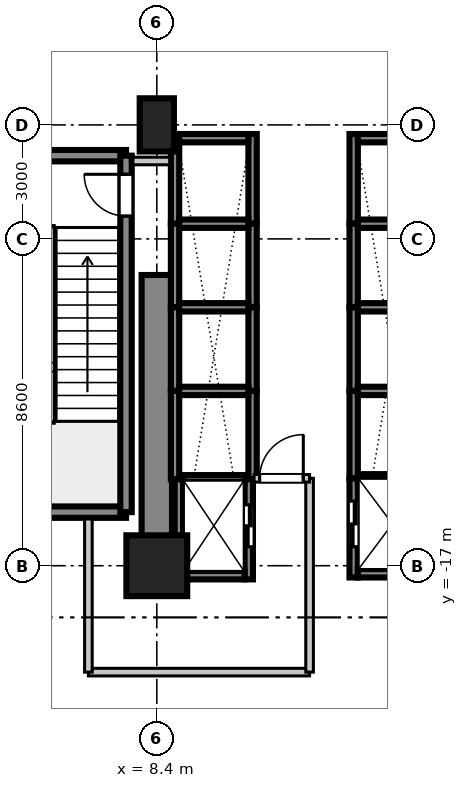
"""IFC4 building model, lengths in metres.
Left out: names, types, materials, properties, quantities, classifications, styles, units other than length and angle.
Written with IfcOpenShell. Run it as: python <this file> out.ifc"""

import sys

from ifc_helpers import new_model, si_unit, direction, frame, frame_2d, origin, origin_2d, place, context, subcontext, project, spatial, rectangle, extrude, source, transform, mapped, element, fill, save


model = new_model("IFC4")
c1 = context("Model", 3, precision=1e-05, world=origin(), true_north=direction((0.0, 1.0)))
c2 = subcontext(c1, "Body", "Model", "MODEL_VIEW")
j1 = project(units=[si_unit("LENGTHUNIT", "METRE"), si_unit("PLANEANGLEUNIT", "RADIAN")], contexts=[c1])
p1 = place(None, origin())
s1 = spatial("IfcSite", under=j1, at=p1, CompositionType="ELEMENT")
p2 = place(p1, origin())
s2 = spatial("IfcBuilding", under=s1, at=p2, CompositionType="ELEMENT")
p3 = place(p2, frame((0.0, 0.0, 5.4)))
s3 = spatial("IfcBuildingStorey", under=s2, at=p3, CompositionType="ELEMENT", Elevation=5.4)
m1 = source(origin(), c2, "Body", "SweptSolid", [
    extrude(rectangle(XDim=1.6, YDim=1.6, at=origin_2d()), origin(), (0.0, 0.0, 1.0), 5.355),
])
p4 = place(p3, frame((8.4, -17.0, 0.0), z_axis=(0.0, 0.0, 1.0), x_axis=(1.0, 0.0, 0.0)))
e1 = element("IfcColumn", 1, at=p4, inside=s3, PredefinedType="COLUMN", context=c2, shape_type="MappedRepresentation", body=[
    mapped(m1, transform((0.0, 0.0, 0.0), scale=1.0)),
])
m2 = source(origin(), c2, "Body", "SweptSolid", [
    extrude(rectangle(XDim=0.9, YDim=1.4, at=origin_2d()), origin(), (0.0, 0.0, 1.0), 5.355),
])
p5 = place(p3, frame((8.4, -5.4, 0.0), z_axis=(0.0, 0.0, 1.0), x_axis=(1.0, 0.0, 0.0)))
e2 = element("IfcColumn", 2, at=p5, inside=s3, PredefinedType="PILASTER", context=c2, shape_type="MappedRepresentation", body=[
    mapped(m2, transform((0.0, 0.0, 0.0), scale=1.0)),
])
m3 = source(origin(), c2, "Body", "SweptSolid", [
    extrude(rectangle(XDim=7.65, YDim=0.8, at=frame_2d((3.825, 0.0))), origin(), (0.0, 0.0, 1.0), 5.08),
])
p6 = place(p3, frame((8.4, -17.0, 0.0), z_axis=(0.0, 0.0, 1.0), x_axis=(0.0, 1.0, 0.0)))
e3 = element("IfcWall", 3, at=p6, inside=s3, PredefinedType="SHEAR", context=c2, shape_type="MappedRepresentation", body=[
    mapped(m3, transform((0.0, 0.0, 0.0), scale=1.0)),
])
m4 = source(origin(), c2, "Body", "SweptSolid", [
    extrude(rectangle(XDim=3.98, YDim=0.3, at=frame_2d((1.99, 0.0))), origin(), (0.0, 0.0, 1.0), 5.08),
])
for number, where, z_axis, x_axis in (
    (4, (3.61, -15.59, 0.0), (0.0, 0.0, 1.0), (1.0, 0.0, 0.0)),
    (5, (3.61, -6.21, 0.0), (0.0, 0.0, 1.0), (1.0, 0.0, 0.0)),
):
    element("IfcWall", number, at=place(p3, frame(where, z_axis=z_axis, x_axis=x_axis)), inside=s3, PredefinedType="SHEAR", context=c2, shape_type="MappedRepresentation", body=[
        mapped(m4, transform((0.0, 0.0, 0.0), scale=1.0)),
    ])
m5 = source(origin(), c2, "Body", "SweptSolid", [
    extrude(rectangle(XDim=9.38, YDim=0.3, at=frame_2d((4.69, 0.0))), origin(), (0.0, 0.0, 1.0), 5.08),
])
p7 = place(p3, frame((7.59, -15.59, 0.0), z_axis=(0.0, 0.0, 1.0), x_axis=(0.0, 1.0, 0.0)))
e6 = element("IfcWall", 6, at=p7, inside=s3, PredefinedType="SHEAR", context=c2, shape_type="MappedRepresentation", body=[
    mapped(m5, transform((0.0, 0.0, 0.0), scale=1.0)),
])
p8 = place(p7, frame((7.79, 0.0, 0.0)))
e7 = element("IfcOpeningElement", 7, at=p8, cuts=e6, PredefinedType="OPENING", context=c2, shape_type="SweptSolid", body=[
    extrude(rectangle(XDim=1.1, YDim=2.15, at=frame_2d((0.55, 1.075))), frame((0.0, 0.16, 0.0), z_axis=(0.0, -1.0, 0.0), x_axis=(1.0, 0.0, 0.0)), (0.0, 0.0, 1.0), 0.32),
])
m6 = source(origin(), c2, "Body", "SweptSolid", [
    extrude(rectangle(XDim=2.36, YDim=0.22, at=frame_2d((1.18, 0.0))), origin(), (0.0, 0.0, 1.0), 5.08),
])
p9 = place(p3, frame((13.58, -8.0, 0.0), z_axis=(0.0, 0.0, 1.0), x_axis=(0.0, 1.0, 0.0)))
e8 = element("IfcWall", 8, at=p9, inside=s3, PredefinedType="SHEAR", context=c2, shape_type="MappedRepresentation", body=[
    mapped(m6, transform((0.0, 0.0, 0.0), scale=1.0)),
])
m7 = source(origin(), c2, "Body", "SweptSolid", [
    extrude(rectangle(XDim=1.82, YDim=0.22, at=frame_2d((0.91, 0.0))), origin(), (0.0, 0.0, 1.0), 5.08),
])
p10 = place(p3, frame((13.69, -5.75, 0.0), z_axis=(0.0, 0.0, 1.0), x_axis=(1.0, 0.0, 0.0)))
e9 = element("IfcWall", 9, at=p10, inside=s3, PredefinedType="SHEAR", context=c2, shape_type="MappedRepresentation", body=[
    mapped(m7, transform((0.0, 0.0, 0.0), scale=1.0)),
])
m8 = source(origin(), c2, "Body", "SweptSolid", [
    extrude(rectangle(XDim=2.2, YDim=0.22, at=frame_2d((1.1, 0.0))), origin(), (0.0, 0.0, 1.0), 5.08),
])
p11 = place(p3, frame((13.58, -10.2, 0.0), z_axis=(0.0, 0.0, 1.0), x_axis=(0.0, 1.0, 0.0)))
e10 = element("IfcWall", 10, at=p11, inside=s3, PredefinedType="SHEAR", context=c2, shape_type="MappedRepresentation", body=[
    mapped(m8, transform((0.0, 0.0, 0.0), scale=1.0)),
])
m9 = source(origin(), c2, "Body", "SweptSolid", [
    extrude(rectangle(XDim=1.82, YDim=0.22, at=frame_2d((0.91, 0.0))), origin(), (0.0, 0.0, 1.0), 5.4),
])
p12 = place(p3, frame((13.69, -8.0, 0.0), z_axis=(0.0, 0.0, 1.0), x_axis=(1.0, 0.0, 0.0)))
e11 = element("IfcWall", 11, at=p12, inside=s3, PredefinedType="SHEAR", context=c2, shape_type="MappedRepresentation", body=[
    mapped(m9, transform((0.0, 0.0, 0.0), scale=1.0)),
])
p13 = place(p3, frame((13.58, -12.4, 0.0), z_axis=(0.0, 0.0, 1.0), x_axis=(0.0, 1.0, 0.0)))
e12 = element("IfcWall", 12, at=p13, inside=s3, PredefinedType="SHEAR", context=c2, shape_type="MappedRepresentation", body=[
    mapped(m8, transform((0.0, 0.0, 0.0), scale=1.0)),
])
p14 = place(p3, frame((13.69, -10.2, 0.0), z_axis=(0.0, 0.0, 1.0), x_axis=(1.0, 0.0, 0.0)))
e13 = element("IfcWall", 13, at=p14, inside=s3, PredefinedType="SHEAR", context=c2, shape_type="MappedRepresentation", body=[
    mapped(m9, transform((0.0, 0.0, 0.0), scale=1.0)),
])
m10 = source(origin(), c2, "Body", "SweptSolid", [
    extrude(rectangle(XDim=2.3, YDim=0.22, at=frame_2d((1.15, 0.0))), origin(), (0.0, 0.0, 1.0), 5.08),
])
p15 = place(p3, frame((13.58, -14.7, 0.0), z_axis=(0.0, 0.0, 1.0), x_axis=(0.0, 1.0, 0.0)))
e14 = element("IfcWall", 14, at=p15, inside=s3, PredefinedType="SHEAR", context=c2, shape_type="MappedRepresentation", body=[
    mapped(m10, transform((0.0, 0.0, 0.0), scale=1.0)),
])
p16 = place(p3, frame((13.69, -12.4, 0.0), z_axis=(0.0, 0.0, 1.0), x_axis=(1.0, 0.0, 0.0)))
e15 = element("IfcWall", 15, at=p16, inside=s3, PredefinedType="SHEAR", context=c2, shape_type="MappedRepresentation", body=[
    mapped(m9, transform((0.0, 0.0, 0.0), scale=1.0)),
])
for number, where, z_axis, x_axis in (
    (16, (8.88, -8.0, 0.0), (0.0, 0.0, 1.0), (0.0, 1.0, 0.0)),
    (17, (10.92, -8.0, 0.0), (0.0, 0.0, 1.0), (0.0, 1.0, 0.0)),
):
    element("IfcWall", number, at=place(p3, frame(where, z_axis=z_axis, x_axis=x_axis)), inside=s3, PredefinedType="SHEAR", context=c2, shape_type="MappedRepresentation", body=[
        mapped(m6, transform((0.0, 0.0, 0.0), scale=1.0)),
    ])
p17 = place(p3, frame((8.99, -5.75, 0.0), z_axis=(0.0, 0.0, 1.0), x_axis=(1.0, 0.0, 0.0)))
e18 = element("IfcWall", 18, at=p17, inside=s3, PredefinedType="SHEAR", context=c2, shape_type="MappedRepresentation", body=[
    mapped(m7, transform((0.0, 0.0, 0.0), scale=1.0)),
])
for number, where, z_axis, x_axis in (
    (19, (8.88, -10.2, 0.0), (0.0, 0.0, 1.0), (0.0, 1.0, 0.0)),
    (20, (10.92, -10.2, 0.0), (0.0, 0.0, 1.0), (0.0, 1.0, 0.0)),
):
    element("IfcWall", number, at=place(p3, frame(where, z_axis=z_axis, x_axis=x_axis)), inside=s3, PredefinedType="SHEAR", context=c2, shape_type="MappedRepresentation", body=[
        mapped(m8, transform((0.0, 0.0, 0.0), scale=1.0)),
    ])
p18 = place(p3, frame((8.99, -8.0, 0.0), z_axis=(0.0, 0.0, 1.0), x_axis=(1.0, 0.0, 0.0)))
e21 = element("IfcWall", 21, at=p18, inside=s3, PredefinedType="SHEAR", context=c2, shape_type="MappedRepresentation", body=[
    mapped(m9, transform((0.0, 0.0, 0.0), scale=1.0)),
])
for number, where, z_axis, x_axis in (
    (22, (8.88, -12.4, 0.0), (0.0, 0.0, 1.0), (0.0, 1.0, 0.0)),
    (23, (10.92, -12.4, 0.0), (0.0, 0.0, 1.0), (0.0, 1.0, 0.0)),
):
    element("IfcWall", number, at=place(p3, frame(where, z_axis=z_axis, x_axis=x_axis)), inside=s3, PredefinedType="SHEAR", context=c2, shape_type="MappedRepresentation", body=[
        mapped(m8, transform((0.0, 0.0, 0.0), scale=1.0)),
    ])
p19 = place(p3, frame((8.99, -10.2, 0.0), z_axis=(0.0, 0.0, 1.0), x_axis=(1.0, 0.0, 0.0)))
e24 = element("IfcWall", 24, at=p19, inside=s3, PredefinedType="SHEAR", context=c2, shape_type="MappedRepresentation", body=[
    mapped(m9, transform((0.0, 0.0, 0.0), scale=1.0)),
])
m11 = source(origin(), c2, "Body", "SweptSolid", [
    extrude(rectangle(XDim=2.325, YDim=0.22, at=frame_2d((1.163, 0.0))), origin(), (0.0, 0.0, 1.0), 5.08),
])
for number, where, z_axis, x_axis in (
    (25, (8.88, -14.725, 0.0), (0.0, 0.0, 1.0), (0.0, 1.0, 0.0)),
    (26, (10.92, -14.725, 0.0), (0.0, 0.0, 1.0), (0.0, 1.0, 0.0)),
):
    element("IfcWall", number, at=place(p3, frame(where, z_axis=z_axis, x_axis=x_axis)), inside=s3, PredefinedType="SHEAR", context=c2, shape_type="MappedRepresentation", body=[
        mapped(m11, transform((0.0, 0.0, 0.0), scale=1.0)),
    ])
p20 = place(p3, frame((8.99, -12.4, 0.0), z_axis=(0.0, 0.0, 1.0), x_axis=(1.0, 0.0, 0.0)))
e27 = element("IfcWall", 27, at=p20, inside=s3, PredefinedType="SHEAR", context=c2, shape_type="MappedRepresentation", body=[
    mapped(m9, transform((0.0, 0.0, 0.0), scale=1.0)),
])
m12 = source(origin(), c2, "Body", "SweptSolid", [
    extrude(rectangle(XDim=2.635, YDim=0.22, at=frame_2d((1.317, 0.0))), origin(), (0.0, 0.0, 1.0), 5.08),
])
p21 = place(p3, frame((8.98, -17.36, 0.0), z_axis=(0.0, 0.0, 1.0), x_axis=(0.0, 1.0, 0.0)))
e28 = element("IfcWall", 28, at=p21, inside=s3, PredefinedType="SHEAR", context=c2, shape_type="MappedRepresentation", body=[
    mapped(m12, transform((0.0, 0.0, 0.0), scale=1.0)),
])
p22 = place(p3, frame((10.82, -17.36, 0.0), z_axis=(0.0, 0.0, 1.0), x_axis=(0.0, 1.0, 0.0)))
e29 = element("IfcWall", 29, at=p22, inside=s3, PredefinedType="SHEAR", context=c2, shape_type="MappedRepresentation", body=[
    mapped(m12, transform((0.0, 0.0, 0.0), scale=1.0)),
])
p23 = place(p22, frame((0.86, 0.0, 0.0)))
e30 = element("IfcOpeningElement", 30, at=p23, cuts=e29, PredefinedType="OPENING", context=c2, shape_type="SweptSolid", body=[
    extrude(rectangle(XDim=1.1, YDim=2.2, at=frame_2d((0.55, 1.1))), frame((0.0, 0.12, 0.0), z_axis=(0.0, -1.0, 0.0), x_axis=(1.0, 0.0, 0.0)), (0.0, 0.0, 1.0), 0.24),
])
m13 = source(origin(), c2, "Body", "SweptSolid", [
    extrude(rectangle(XDim=1.62, YDim=0.22, at=frame_2d((0.81, 0.0))), origin(), (0.0, 0.0, 1.0), 5.08),
])
p24 = place(p3, frame((9.09, -17.25, 0.0), z_axis=(0.0, 0.0, 1.0), x_axis=(1.0, 0.0, 0.0)))
e31 = element("IfcWall", 31, at=p24, inside=s3, PredefinedType="SHEAR", context=c2, shape_type="MappedRepresentation", body=[
    mapped(m13, transform((0.0, 0.0, 0.0), scale=1.0)),
])
m14 = source(origin(), c2, "Body", "SweptSolid", [
    extrude(rectangle(XDim=1.62, YDim=0.22, at=frame_2d((0.81, 0.0))), origin(), (0.0, 0.0, 1.0), 5.4),
])
p25 = place(p3, frame((9.09, -14.725, 0.0), z_axis=(0.0, 0.0, 1.0), x_axis=(1.0, 0.0, 0.0)))
e32 = element("IfcWall", 32, at=p25, inside=s3, PredefinedType="SHEAR", context=c2, shape_type="MappedRepresentation", body=[
    mapped(m14, transform((0.0, 0.0, 0.0), scale=1.0)),
])
m15 = source(origin(), c2, "Body", "SweptSolid", [
    extrude(rectangle(XDim=2.61, YDim=0.22, at=frame_2d((1.305, 0.0))), origin(), (0.0, 0.0, 1.0), 5.08),
])
p26 = place(p3, frame((13.58, -17.31, 0.0), z_axis=(0.0, 0.0, 1.0), x_axis=(0.0, 1.0, 0.0)))
e33 = element("IfcWall", 33, at=p26, inside=s3, PredefinedType="SHEAR", context=c2, shape_type="MappedRepresentation", body=[
    mapped(m15, transform((0.0, 0.0, 0.0), scale=1.0)),
])
p27 = place(p26, frame((0.81, 0.0, 0.0)))
e34 = element("IfcOpeningElement", 34, at=p27, cuts=e33, PredefinedType="OPENING", context=c2, shape_type="SweptSolid", body=[
    extrude(rectangle(XDim=1.2, YDim=2.2, at=frame_2d((0.6, 1.1))), frame((0.0, 0.12, 0.0), z_axis=(0.0, -1.0, 0.0), x_axis=(1.0, 0.0, 0.0)), (0.0, 0.0, 1.0), 0.24),
])
p28 = place(p3, frame((13.69, -17.2, 0.0), z_axis=(0.0, 0.0, 1.0), x_axis=(1.0, 0.0, 0.0)))
e35 = element("IfcWall", 35, at=p28, inside=s3, PredefinedType="SHEAR", context=c2, shape_type="MappedRepresentation", body=[
    mapped(m7, transform((0.0, 0.0, 0.0), scale=1.0)),
])
p29 = place(p3, frame((13.69, -14.7, 0.0), z_axis=(0.0, 0.0, 1.0), x_axis=(1.0, 0.0, 0.0)))
e36 = element("IfcWall", 36, at=p29, inside=s3, PredefinedType="SHEAR", context=c2, shape_type="MappedRepresentation", body=[
    mapped(m9, transform((0.0, 0.0, 0.0), scale=1.0)),
])
m16 = source(origin(), c2, "Body", "SweptSolid", [
    extrude(rectangle(XDim=5.82, YDim=0.2, at=frame_2d((2.91, 0.0))), origin(), (0.0, 0.0, 1.0), 3.4),
])
p30 = place(p3, frame((6.6, -19.8, 0.0), z_axis=(0.0, 0.0, 1.0), x_axis=(1.0, 0.0, 0.0)))
e37 = element("IfcWall", 37, at=p30, inside=s3, PredefinedType="PARTITIONING", context=c2, shape_type="MappedRepresentation", body=[
    mapped(m16, transform((0.0, 0.0, 0.0), scale=1.0)),
])
m17 = source(origin(), c2, "Body", "SweptSolid", [
    extrude(rectangle(XDim=4.03, YDim=0.2, at=frame_2d((2.015, 0.0))), origin(), (0.0, 0.0, 1.0), 3.4),
])
p31 = place(p3, frame((6.6, -19.8, 0.0), z_axis=(0.0, 0.0, 1.0), x_axis=(0.0, 1.0, 0.0)))
e38 = element("IfcWall", 38, at=p31, inside=s3, PredefinedType="PARTITIONING", context=c2, shape_type="MappedRepresentation", body=[
    mapped(m17, transform((0.0, 0.0, 0.0), scale=1.0)),
])
m18 = source(origin(), c2, "Body", "SweptSolid", [
    extrude(rectangle(XDim=5.1, YDim=0.2, at=frame_2d((2.55, 0.0))), origin(), (0.0, 0.0, 1.0), 3.4),
])
p32 = place(p3, frame((12.42, -19.8, 0.0), z_axis=(0.0, 0.0, 1.0), x_axis=(0.0, 1.0, 0.0)))
e39 = element("IfcWall", 39, at=p32, inside=s3, PredefinedType="PARTITIONING", context=c2, shape_type="MappedRepresentation", body=[
    mapped(m18, transform((0.0, 0.0, 0.0), scale=1.0)),
])
m19 = source(origin(), c2, "Body", "SweptSolid", [
    extrude(rectangle(XDim=1.46, YDim=0.2, at=frame_2d((0.73, 0.0))), origin(), (0.0, 0.0, 1.0), 3.4),
])
p33 = place(p3, frame((10.96, -14.7, 0.0), z_axis=(0.0, 0.0, 1.0), x_axis=(1.0, 0.0, 0.0)))
e40 = element("IfcWall", 40, at=p33, inside=s3, PredefinedType="PARTITIONING", context=c2, shape_type="MappedRepresentation", body=[
    mapped(m19, transform((0.0, 0.0, 0.0), scale=1.0)),
])
p34 = place(p33, frame((0.145, 0.0, 0.0)))
e41 = element("IfcOpeningElement", 41, at=p34, cuts=e40, PredefinedType="OPENING", context=c2, shape_type="SweptSolid", body=[
    extrude(rectangle(XDim=1.15, YDim=2.15, at=frame_2d((0.575, 1.075))), frame((0.0, 0.11, 0.0), z_axis=(0.0, -1.0, 0.0), x_axis=(1.0, 0.0, 0.0)), (0.0, 0.0, 1.0), 0.22),
])
m20 = source(origin(), c2, "Body", "SweptSolid", [
    extrude(rectangle(XDim=0.97, YDim=0.2, at=frame_2d((0.485, 0.0))), origin(), (0.0, 0.0, 1.0), 3.4),
])
p35 = place(p3, frame((7.77, -6.35, 0.0), z_axis=(0.0, 0.0, 1.0), x_axis=(1.0, 0.0, 0.0)))
e42 = element("IfcWall", 42, at=p35, inside=s3, PredefinedType="PARTITIONING", context=c2, shape_type="MappedRepresentation", body=[
    mapped(m20, transform((0.0, 0.0, 0.0), scale=1.0)),
])
m21 = source(origin(), c2, "Body", "SweptSolid", [
    extrude(rectangle(XDim=1.1, YDim=2.15, at=frame_2d((0.55, 1.075))), frame((0.0, 0.025, 0.0), z_axis=(0.0, -1.0, 0.0), x_axis=(1.0, 0.0, 0.0)), (0.0, 0.0, 1.0), 0.05),
])
p36 = place(p8, origin())
e43 = element("IfcDoor", 43, at=p36, inside=s3, OperationType="SINGLE_SWING_RIGHT", PredefinedType="DOOR", context=c2, shape_type="MappedRepresentation", body=[
    mapped(m21, transform((0.0, 0.0, 0.0), scale=1.0)),
])
fill(e7, e43)
m22 = source(origin(), c2, "Body", "SweptSolid", [
    extrude(rectangle(XDim=1.1, YDim=2.2, at=frame_2d((0.55, 1.1))), frame((0.0, 0.025, 0.0), z_axis=(0.0, -1.0, 0.0), x_axis=(1.0, 0.0, 0.0)), (0.0, 0.0, 1.0), 0.05),
])
p37 = place(p23, frame((1.1, 0.0, 0.0), z_axis=(0.0, 0.0, 1.0), x_axis=(-1.0, 0.0, 0.0)))
e44 = element("IfcDoor", 44, at=p37, inside=s3, OperationType="DOUBLE_DOOR_SLIDING", PredefinedType="DOOR", context=c2, shape_type="MappedRepresentation", body=[
    mapped(m22, transform((0.0, 0.0, 0.0), scale=1.0)),
])
fill(e30, e44)
m23 = source(origin(), c2, "Body", "SweptSolid", [
    extrude(rectangle(XDim=1.2, YDim=2.2, at=frame_2d((0.6, 1.1))), frame((0.0, 0.025, 0.0), z_axis=(0.0, -1.0, 0.0), x_axis=(1.0, 0.0, 0.0)), (0.0, 0.0, 1.0), 0.05),
])
p38 = place(p27, origin())
e45 = element("IfcDoor", 45, at=p38, inside=s3, OperationType="DOUBLE_DOOR_SLIDING", PredefinedType="DOOR", context=c2, shape_type="MappedRepresentation", body=[
    mapped(m23, transform((0.0, 0.0, 0.0), scale=1.0)),
])
fill(e34, e45)
m24 = source(origin(), c2, "Body", "SweptSolid", [
    extrude(rectangle(XDim=1.15, YDim=2.15, at=frame_2d((0.575, 1.075))), frame((0.0, 0.025, 0.0), z_axis=(0.0, -1.0, 0.0), x_axis=(1.0, 0.0, 0.0)), (0.0, 0.0, 1.0), 0.05),
])
p39 = place(p34, origin())
e46 = element("IfcDoor", 46, at=p39, inside=s3, OperationType="SINGLE_SWING_RIGHT", PredefinedType="DOOR", context=c2, shape_type="MappedRepresentation", body=[
    mapped(m24, transform((0.0, 0.0, 0.0), scale=1.0)),
])
fill(e41, e46)
save(model, sys.argv[1])
